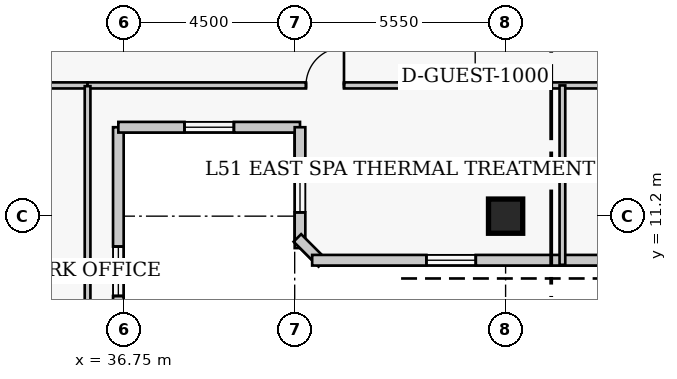
"""IFC4 building model, lengths in metres.
Left out: names, types, materials, properties, quantities, classifications, styles, units other than length and angle.
Written with IfcOpenShell. Run it as: python <this file> out.ifc"""

import sys

from ifc_helpers import new_model, si_unit, direction, frame, frame_2d, origin, origin_2d, place, context, subcontext, project, spatial, rectangle, extrude, element, fill, save


model = new_model("IFC4")
c1 = context("Model", 3, precision=1e-05, world=origin(), true_north=direction((0.0, 1.0)))
c2 = subcontext(c1, "Body", "Model", "MODEL_VIEW")
j1 = project(units=[si_unit("LENGTHUNIT", "METRE"), si_unit("PLANEANGLEUNIT", "RADIAN")], contexts=[c1])
p1 = place(None, origin())
s1 = spatial("IfcSite", under=j1, at=p1, CompositionType="ELEMENT")
p2 = place(p1, origin())
s2 = spatial("IfcBuilding", under=s1, at=p2, CompositionType="ELEMENT")
p3 = place(p2, frame((0.0, 0.0, 204.6)))
s3 = spatial("IfcBuildingStorey", under=s2, at=p3, CompositionType="ELEMENT", Elevation=204.6)
p4 = place(p3, frame((46.8, 11.2, 0.0), z_axis=(0.0, 0.0, 1.0), x_axis=(1.0, 0.0, 0.0)))
e1 = element("IfcColumn", 1, at=p4, inside=s3, PredefinedType="COLUMN", context=c2, shape_type="SweptSolid", body=[
    extrude(rectangle(XDim=0.9, YDim=0.9, at=origin_2d()), origin(), (0.0, 0.0, 1.0), 3.9),
])
p5 = place(p3, frame((36.61, 5.96, 0.0), z_axis=(0.0, 0.0, 1.0), x_axis=(0.0, 1.0, 0.0)))
e2 = element("IfcWall", 2, at=p5, inside=s3, PredefinedType="SOLIDWALL", context=c2, shape_type="SweptSolid", body=[
    extrude(rectangle(XDim=7.58, YDim=0.28, at=frame_2d((3.79, 0.0))), origin(), (0.0, 0.0, 1.0), 3.65),
])
p6 = place(p5, frame((3.14, 0.0, 0.85)))
e3 = element("IfcOpeningElement", 3, at=p6, cuts=e2, PredefinedType="OPENING", context=c2, shape_type="SweptSolid", body=[
    extrude(rectangle(XDim=1.3, YDim=1.7, at=frame_2d((0.65, 0.85))), frame((0.0, 0.15, 0.0), z_axis=(0.0, -1.0, 0.0), x_axis=(1.0, 0.0, 0.0)), (0.0, 0.0, 1.0), 0.3),
])
p7 = place(p3, frame((36.61, 13.54, 0.0), z_axis=(0.0, 0.0, 1.0), x_axis=(1.0, 0.0, 0.0)))
e4 = element("IfcWall", 4, at=p7, inside=s3, PredefinedType="SOLIDWALL", context=c2, shape_type="SweptSolid", body=[
    extrude(rectangle(XDim=4.78, YDim=0.28, at=frame_2d((2.39, 0.0))), origin(), (0.0, 0.0, 1.0), 3.65),
])
p8 = place(p7, frame((1.74, 0.0, 0.85)))
e5 = element("IfcOpeningElement", 5, at=p8, cuts=e4, PredefinedType="OPENING", context=c2, shape_type="SweptSolid", body=[
    extrude(rectangle(XDim=1.3, YDim=1.7, at=frame_2d((0.65, 0.85))), frame((0.0, 0.15, 0.0), z_axis=(0.0, -1.0, 0.0), x_axis=(1.0, 0.0, 0.0)), (0.0, 0.0, 1.0), 0.3),
])
p9 = place(p3, frame((41.39, 13.54, 0.0), z_axis=(0.0, 0.0, 1.0), x_axis=(0.0, -1.0, 0.0)))
e6 = element("IfcWall", 6, at=p9, inside=s3, PredefinedType="SOLIDWALL", context=c2, shape_type="SweptSolid", body=[
    extrude(rectangle(XDim=3.18, YDim=0.28, at=frame_2d((1.59, 0.0))), origin(), (0.0, 0.0, 1.0), 3.65),
])
p10 = place(p9, frame((0.94, 0.0, 0.85)))
e7 = element("IfcOpeningElement", 7, at=p10, cuts=e6, PredefinedType="OPENING", context=c2, shape_type="SweptSolid", body=[
    extrude(rectangle(XDim=1.3, YDim=1.7, at=frame_2d((0.65, 0.85))), frame((0.0, 0.15, 0.0), z_axis=(0.0, -1.0, 0.0), x_axis=(1.0, 0.0, 0.0)), (0.0, 0.0, 1.0), 0.3),
])
p11 = place(p3, frame((41.321, 10.627, 0.0), z_axis=(0.0, 0.0, 1.0), x_axis=(0.707106781187, -0.707106781187, 0.0)))
e8 = element("IfcWall", 8, at=p11, inside=s3, PredefinedType="SOLIDWALL", context=c2, shape_type="SweptSolid", body=[
    extrude(rectangle(XDim=0.928, YDim=0.28, at=frame_2d((0.464, 0.0))), origin(), (0.0, 0.0, 1.0), 3.65),
])
p12 = place(p3, frame((41.71, 10.04, 0.0), z_axis=(0.0, 0.0, 1.0), x_axis=(1.0, 0.0, 0.0)))
e9 = element("IfcWall", 9, at=p12, inside=s3, PredefinedType="SOLIDWALL", context=c2, shape_type="SweptSolid", body=[
    extrude(rectangle(XDim=25.83, YDim=0.28, at=frame_2d((12.915, 0.0))), origin(), (0.0, 0.0, 1.0), 3.65),
])
p13 = place(p12, frame((3.005, 0.0, 0.85)))
e10 = element("IfcOpeningElement", 10, at=p13, cuts=e9, PredefinedType="OPENING", context=c2, shape_type="SweptSolid", body=[
    extrude(rectangle(XDim=1.3, YDim=1.7, at=frame_2d((0.65, 0.85))), frame((0.0, 0.15, 0.0), z_axis=(0.0, -1.0, 0.0), x_axis=(1.0, 0.0, 0.0)), (0.0, 0.0, 1.0), 0.3),
])
p14 = place(p12, frame((13.415, 0.0, 0.85)))
e11 = element("IfcOpeningElement", 11, at=p14, cuts=e9, PredefinedType="OPENING", context=c2, shape_type="SweptSolid", body=[
    extrude(rectangle(XDim=1.3, YDim=1.7, at=frame_2d((0.65, 0.85))), frame((0.0, 0.15, 0.0), z_axis=(0.0, -1.0, 0.0), x_axis=(1.0, 0.0, 0.0)), (0.0, 0.0, 1.0), 0.3),
])
p15 = place(p12, frame((21.525, 0.0, 0.85)))
e12 = element("IfcOpeningElement", 12, at=p15, cuts=e9, PredefinedType="OPENING", context=c2, shape_type="SweptSolid", body=[
    extrude(rectangle(XDim=1.3, YDim=1.7, at=frame_2d((0.65, 0.85))), frame((0.0, 0.15, 0.0), z_axis=(0.0, -1.0, 0.0), x_axis=(1.0, 0.0, 0.0)), (0.0, 0.0, 1.0), 0.3),
])
p16 = place(p3, frame((18.8, 14.64, 0.0), z_axis=(0.0, 0.0, 1.0), x_axis=(1.0, 0.0, 0.0)))
e13 = element("IfcWall", 13, at=p16, inside=s3, PredefinedType="PARTITIONING", context=c2, shape_type="SweptSolid", body=[
    extrude(rectangle(XDim=17.0, YDim=0.16, at=frame_2d((8.5, 0.0))), origin(), (0.0, 0.0, 1.0), 3.65),
])
p17 = place(p16, frame((4.95, 0.0, 0.0)))
e14 = element("IfcOpeningElement", 14, at=p17, cuts=e13, PredefinedType="OPENING", context=c2, shape_type="SweptSolid", body=[
    extrude(rectangle(XDim=1.0, YDim=2.15, at=frame_2d((0.5, 1.075))), frame((0.0, 0.09, 0.0), z_axis=(0.0, -1.0, 0.0), x_axis=(1.0, 0.0, 0.0)), (0.0, 0.0, 1.0), 0.18),
])
p18 = place(p16, frame((12.265, 0.0, 0.0)))
e15 = element("IfcOpeningElement", 15, at=p18, cuts=e13, PredefinedType="OPENING", context=c2, shape_type="SweptSolid", body=[
    extrude(rectangle(XDim=1.0, YDim=2.15, at=frame_2d((0.5, 1.075))), frame((0.0, 0.09, 0.0), z_axis=(0.0, -1.0, 0.0), x_axis=(1.0, 0.0, 0.0)), (0.0, 0.0, 1.0), 0.18),
])
p19 = place(p3, frame((35.8, 14.64, 0.0), z_axis=(0.0, 0.0, 1.0), x_axis=(1.0, 0.0, 0.0)))
e16 = element("IfcWall", 16, at=p19, inside=s3, PredefinedType="PARTITIONING", context=c2, shape_type="SweptSolid", body=[
    extrude(rectangle(XDim=22.85, YDim=0.16, at=frame_2d((11.425, 0.0))), origin(), (0.0, 0.0, 1.0), 3.65),
])
p20 = place(p19, frame((5.748, 0.0, 0.0)))
e17 = element("IfcOpeningElement", 17, at=p20, cuts=e16, PredefinedType="OPENING", context=c2, shape_type="SweptSolid", body=[
    extrude(rectangle(XDim=1.0, YDim=2.15, at=frame_2d((0.5, 1.075))), frame((0.0, 0.09, 0.0), z_axis=(0.0, -1.0, 0.0), x_axis=(1.0, 0.0, 0.0)), (0.0, 0.0, 1.0), 0.18),
])
p21 = place(p3, frame((35.8, 5.52, 0.0), z_axis=(0.0, 0.0, 1.0), x_axis=(0.0, 1.0, 0.0)))
e18 = element("IfcWall", 18, at=p21, inside=s3, PredefinedType="PARTITIONING", context=c2, shape_type="SweptSolid", body=[
    extrude(rectangle(XDim=9.1, YDim=0.15, at=frame_2d((4.55, 0.0))), origin(), (0.0, 0.0, 1.0), 3.65),
])
p22 = place(p3, frame((48.295, 9.92, 0.0), z_axis=(0.0, 0.0, 1.0), x_axis=(0.0, 1.0, 0.0)))
e19 = element("IfcWall", 19, at=p22, inside=s3, PredefinedType="PARTITIONING", context=c2, shape_type="SweptSolid", body=[
    extrude(rectangle(XDim=4.72, YDim=0.15, at=frame_2d((2.36, 0.0))), origin(), (0.0, 0.0, 1.0), 3.65),
])
p23 = place(p6, origin())
e20 = element("IfcWindow", 20, at=p23, inside=s3, PartitioningType="SINGLE_PANEL", PredefinedType="WINDOW", context=c2, shape_type="SweptSolid", body=[
    extrude(rectangle(XDim=1.3, YDim=1.7, at=frame_2d((0.65, 0.85))), frame((0.0, 0.03, 0.0), z_axis=(0.0, -1.0, 0.0), x_axis=(1.0, 0.0, 0.0)), (0.0, 0.0, 1.0), 0.06),
])
fill(e3, e20)
p24 = place(p8, origin())
e21 = element("IfcWindow", 21, at=p24, inside=s3, PartitioningType="SINGLE_PANEL", PredefinedType="WINDOW", context=c2, shape_type="SweptSolid", body=[
    extrude(rectangle(XDim=1.3, YDim=1.7, at=frame_2d((0.65, 0.85))), frame((0.0, 0.03, 0.0), z_axis=(0.0, -1.0, 0.0), x_axis=(1.0, 0.0, 0.0)), (0.0, 0.0, 1.0), 0.06),
])
fill(e5, e21)
p25 = place(p10, origin())
e22 = element("IfcWindow", 22, at=p25, inside=s3, PartitioningType="SINGLE_PANEL", PredefinedType="WINDOW", context=c2, shape_type="SweptSolid", body=[
    extrude(rectangle(XDim=1.3, YDim=1.7, at=frame_2d((0.65, 0.85))), frame((0.0, 0.03, 0.0), z_axis=(0.0, -1.0, 0.0), x_axis=(1.0, 0.0, 0.0)), (0.0, 0.0, 1.0), 0.06),
])
fill(e7, e22)
p26 = place(p13, origin())
e23 = element("IfcWindow", 23, at=p26, inside=s3, PartitioningType="SINGLE_PANEL", PredefinedType="WINDOW", context=c2, shape_type="SweptSolid", body=[
    extrude(rectangle(XDim=1.3, YDim=1.7, at=frame_2d((0.65, 0.85))), frame((0.0, 0.03, 0.0), z_axis=(0.0, -1.0, 0.0), x_axis=(1.0, 0.0, 0.0)), (0.0, 0.0, 1.0), 0.06),
])
fill(e10, e23)
p27 = place(p20, origin())
e24 = element("IfcDoor", 24, at=p27, inside=s3, OperationType="SINGLE_SWING_RIGHT", PredefinedType="DOOR", context=c2, shape_type="SweptSolid", body=[
    extrude(rectangle(XDim=1.0, YDim=2.15, at=frame_2d((0.5, 1.075))), frame((0.0, 0.025, 0.0), z_axis=(0.0, -1.0, 0.0), x_axis=(1.0, 0.0, 0.0)), (0.0, 0.0, 1.0), 0.05),
])
fill(e17, e24)
save(model, sys.argv[1])
